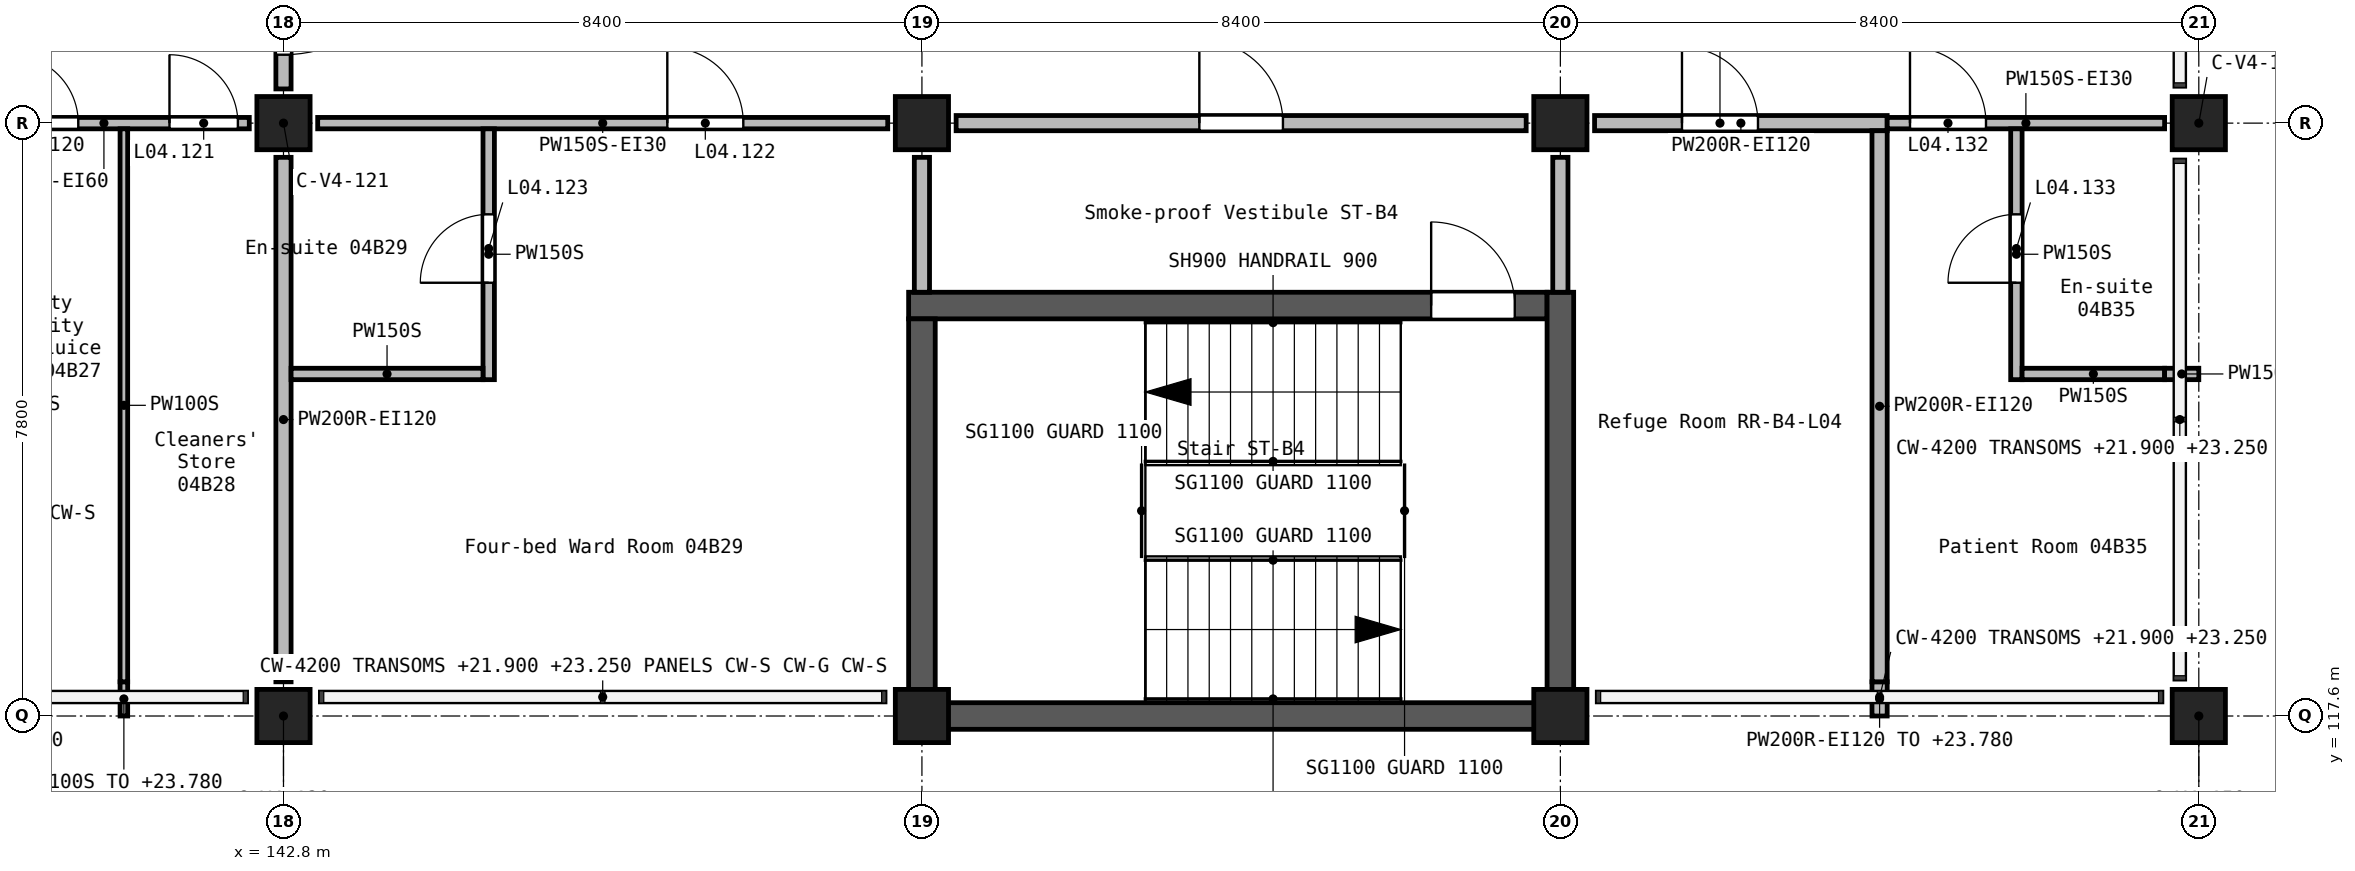
"""IFC4 building model, lengths in metres.
Left out: names, types, materials, properties, quantities, classifications, styles, units other than length and angle.
Written with IfcOpenShell. Run it as: python <this file> out.ifc"""

import sys

from ifc_helpers import new_model, si_unit, direction, frame, frame_2d, origin, origin_2d, place, context, subcontext, project, spatial, rectangle, extrude, element, fill, save


model = new_model("IFC4")
c1 = context("Model", 3, precision=1e-05, world=origin(), true_north=direction((0.0, 1.0)))
c2 = subcontext(c1, "Body", "Model", "MODEL_VIEW")
j1 = project(units=[si_unit("LENGTHUNIT", "METRE"), si_unit("PLANEANGLEUNIT", "RADIAN")], contexts=[c1])
p1 = place(None, origin())
s1 = spatial("IfcSite", under=j1, at=p1, CompositionType="ELEMENT")
p2 = place(p1, origin())
s2 = spatial("IfcBuilding", under=s1, at=p2, CompositionType="ELEMENT")
p3 = place(p2, frame((0.0, 0.0, 21.0)))
s3 = spatial("IfcBuildingStorey", under=s2, at=p3, CompositionType="ELEMENT", Elevation=21.0)
for number, where, z_axis, x_axis in (
    (1, (142.8, 117.6, 0.0), (0.0, 0.0, 1.0), (1.0, 0.0, 0.0)),
    (2, (142.8, 125.4, 0.0), (0.0, 0.0, 1.0), (1.0, 0.0, 0.0)),
    (3, (151.2, 117.6, 0.0), (0.0, 0.0, 1.0), (1.0, 0.0, 0.0)),
    (4, (151.2, 125.4, 0.0), (0.0, 0.0, 1.0), (1.0, 0.0, 0.0)),
    (5, (159.6, 117.6, 0.0), (0.0, 0.0, 1.0), (1.0, 0.0, 0.0)),
    (6, (159.6, 125.4, 0.0), (0.0, 0.0, 1.0), (1.0, 0.0, 0.0)),
    (7, (168.0, 117.6, 0.0), (0.0, 0.0, 1.0), (1.0, 0.0, 0.0)),
    (8, (168.0, 125.4, 0.0), (0.0, 0.0, 1.0), (1.0, 0.0, 0.0)),
):
    element("IfcColumn", number, at=place(p3, frame(where, z_axis=z_axis, x_axis=x_axis)), inside=s3, PredefinedType="COLUMN", context=c2, shape_type="SweptSolid", body=[
        extrude(rectangle(XDim=0.7, YDim=0.7, at=origin_2d()), origin(), (0.0, 0.0, 1.0), 3.9),
    ])
p4 = place(p3, frame((151.025, 123.0, 0.0), z_axis=(0.0, 0.0, 1.0), x_axis=(1.0, 0.0, 0.0)))
e9 = element("IfcWall", 9, at=p4, inside=s3, PredefinedType="SHEAR", context=c2, shape_type="SweptSolid", body=[
    extrude(rectangle(XDim=8.4, YDim=0.35, at=frame_2d((4.2, 0.0))), origin(), (0.0, 0.0, 1.0), 3.9),
])
p5 = place(p4, frame((6.875, 0.0, 0.0)))
e10 = element("IfcOpeningElement", 10, at=p5, cuts=e9, PredefinedType="OPENING", context=c2, shape_type="SweptSolid", body=[
    extrude(rectangle(XDim=1.1, YDim=2.1, at=frame_2d((0.55, 1.05))), frame((0.0, 0.185, 0.0), z_axis=(0.0, -1.0, 0.0), x_axis=(1.0, 0.0, 0.0)), (0.0, 0.0, 1.0), 0.37),
])
p6 = place(p3, frame((151.2, 117.425, 0.0), z_axis=(0.0, 0.0, 1.0), x_axis=(0.0, 1.0, 0.0)))
e11 = element("IfcWall", 11, at=p6, inside=s3, PredefinedType="SHEAR", context=c2, shape_type="SweptSolid", body=[
    extrude(rectangle(XDim=5.4, YDim=0.35, at=frame_2d((2.7, 0.0))), origin(), (0.0, 0.0, 1.0), 3.9),
])
p7 = place(p3, frame((151.375, 117.6, 0.0), z_axis=(0.0, 0.0, 1.0), x_axis=(1.0, 0.0, 0.0)))
e12 = element("IfcWall", 12, at=p7, inside=s3, PredefinedType="SHEAR", context=c2, shape_type="SweptSolid", body=[
    extrude(rectangle(XDim=8.05, YDim=0.35, at=frame_2d((4.025, 0.0))), origin(), (0.0, 0.0, 1.0), 3.9),
])
p8 = place(p3, frame((159.6, 117.425, 0.0), z_axis=(0.0, 0.0, 1.0), x_axis=(0.0, 1.0, 0.0)))
e13 = element("IfcWall", 13, at=p8, inside=s3, PredefinedType="SHEAR", context=c2, shape_type="SweptSolid", body=[
    extrude(rectangle(XDim=5.75, YDim=0.35, at=frame_2d((2.875, 0.0))), origin(), (0.0, 0.0, 1.0), 3.9),
])
p9 = place(p3, frame((142.8, 128.55, 0.0), z_axis=(0.0, 0.0, 1.0), x_axis=(0.0, -1.0, 0.0)))
e14 = element("IfcWall", 14, at=p9, inside=s3, PredefinedType="SOLIDWALL", context=c2, shape_type="SweptSolid", body=[
    extrude(rectangle(XDim=2.7, YDim=0.2, at=frame_2d((1.35, 0.0))), origin(), (0.0, 0.0, 1.0), 3.6),
])
p10 = place(p9, frame((0.45, 0.0, 0.0)))
e15 = element("IfcOpeningElement", 15, at=p10, cuts=e14, PredefinedType="OPENING", context=c2, shape_type="SweptSolid", body=[
    extrude(rectangle(XDim=1.8, YDim=2.1, at=frame_2d((0.9, 1.05))), frame((0.0, 0.11, 0.0), z_axis=(0.0, -1.0, 0.0), x_axis=(1.0, 0.0, 0.0)), (0.0, 0.0, 1.0), 0.22),
])
p11 = place(p3, frame((142.8, 124.95, 0.0), z_axis=(0.0, 0.0, 1.0), x_axis=(0.0, -1.0, 0.0)))
e16 = element("IfcWall", 16, at=p11, inside=s3, PredefinedType="SOLIDWALL", context=c2, shape_type="SweptSolid", body=[
    extrude(rectangle(XDim=6.9, YDim=0.2, at=frame_2d((3.45, 0.0))), origin(), (0.0, 0.0, 1.0), 3.6),
])
p12 = place(p3, frame((151.65, 125.4, 0.0), z_axis=(0.0, 0.0, 1.0), x_axis=(1.0, 0.0, 0.0)))
e17 = element("IfcWall", 17, at=p12, inside=s3, PredefinedType="SOLIDWALL", context=c2, shape_type="SweptSolid", body=[
    extrude(rectangle(XDim=7.5, YDim=0.2, at=frame_2d((3.75, 0.0))), origin(), (0.0, 0.0, 1.0), 3.6),
])
p13 = place(p12, frame((3.2, 0.0, 0.0)))
e18 = element("IfcOpeningElement", 18, at=p13, cuts=e17, PredefinedType="OPENING", context=c2, shape_type="SweptSolid", body=[
    extrude(rectangle(XDim=1.1, YDim=2.1, at=frame_2d((0.55, 1.05))), frame((0.0, 0.11, 0.0), z_axis=(0.0, -1.0, 0.0), x_axis=(1.0, 0.0, 0.0)), (0.0, 0.0, 1.0), 0.22),
])
p14 = place(p3, frame((160.05, 125.4, 0.0), z_axis=(0.0, 0.0, 1.0), x_axis=(1.0, 0.0, 0.0)))
e19 = element("IfcWall", 19, at=p14, inside=s3, PredefinedType="SOLIDWALL", context=c2, shape_type="SweptSolid", body=[
    extrude(rectangle(XDim=3.85, YDim=0.2, at=frame_2d((1.925, 0.0))), origin(), (0.0, 0.0, 1.0), 3.6),
])
p15 = place(p14, frame((1.15, 0.0, 0.0)))
e20 = element("IfcOpeningElement", 20, at=p15, cuts=e19, PredefinedType="OPENING", context=c2, shape_type="SweptSolid", body=[
    extrude(rectangle(XDim=1.0, YDim=2.1, at=frame_2d((0.5, 1.05))), frame((0.0, 0.11, 0.0), z_axis=(0.0, -1.0, 0.0), x_axis=(1.0, 0.0, 0.0)), (0.0, 0.0, 1.0), 0.22),
])
p16 = place(p3, frame((159.6, 123.175, 0.0), z_axis=(0.0, 0.0, 1.0), x_axis=(0.0, 1.0, 0.0)))
e21 = element("IfcWall", 21, at=p16, inside=s3, PredefinedType="SOLIDWALL", context=c2, shape_type="SweptSolid", body=[
    extrude(rectangle(XDim=1.775, YDim=0.2, at=frame_2d((0.887, 0.0))), origin(), (0.0, 0.0, 1.0), 3.6),
])
p17 = place(p3, frame((163.8, 117.6, 0.0), z_axis=(0.0, 0.0, 1.0), x_axis=(0.0, 1.0, 0.0)))
e22 = element("IfcWall", 22, at=p17, inside=s3, PredefinedType="SOLIDWALL", context=c2, shape_type="SweptSolid", body=[
    extrude(rectangle(XDim=0.45, YDim=0.2, at=frame_2d((0.225, 0.0))), origin(), (0.0, 0.0, 1.0), 2.78),
])
p18 = place(p3, frame((163.8, 118.05, 0.0), z_axis=(0.0, 0.0, 1.0), x_axis=(0.0, 1.0, 0.0)))
e23 = element("IfcWall", 23, at=p18, inside=s3, PredefinedType="SOLIDWALL", context=c2, shape_type="SweptSolid", body=[
    extrude(rectangle(XDim=7.25, YDim=0.2, at=frame_2d((3.625, 0.0))), origin(), (0.0, 0.0, 1.0), 3.6),
])
p19 = place(p3, frame((151.2, 123.175, 0.0), z_axis=(0.0, 0.0, 1.0), x_axis=(0.0, 1.0, 0.0)))
e24 = element("IfcWall", 24, at=p19, inside=s3, PredefinedType="SOLIDWALL", context=c2, shape_type="SweptSolid", body=[
    extrude(rectangle(XDim=1.775, YDim=0.2, at=frame_2d((0.887, 0.0))), origin(), (0.0, 0.0, 1.0), 3.6),
])
p20 = place(p3, frame((143.25, 125.4, 0.0), z_axis=(0.0, 0.0, 1.0), x_axis=(1.0, 0.0, 0.0)))
e25 = element("IfcWall", 25, at=p20, inside=s3, PredefinedType="PARTITIONING", context=c2, shape_type="SweptSolid", body=[
    extrude(rectangle(XDim=7.5, YDim=0.15, at=frame_2d((3.75, 0.0))), origin(), (0.0, 0.0, 1.0), 3.6),
])
p21 = place(p20, frame((4.6, 0.0, 0.0)))
e26 = element("IfcOpeningElement", 26, at=p21, cuts=e25, PredefinedType="OPENING", context=c2, shape_type="SweptSolid", body=[
    extrude(rectangle(XDim=1.0, YDim=2.1, at=frame_2d((0.5, 1.05))), frame((0.0, 0.085, 0.0), z_axis=(0.0, -1.0, 0.0), x_axis=(1.0, 0.0, 0.0)), (0.0, 0.0, 1.0), 0.17),
])
p22 = place(p3, frame((138.525, 125.4, 0.0), z_axis=(0.0, 0.0, 1.0), x_axis=(1.0, 0.0, 0.0)))
e27 = element("IfcWall", 27, at=p22, inside=s3, PredefinedType="PARTITIONING", context=c2, shape_type="SweptSolid", body=[
    extrude(rectangle(XDim=3.825, YDim=0.15, at=frame_2d((1.913, 0.0))), origin(), (0.0, 0.0, 1.0), 3.6),
])
p23 = place(p22, frame((0.675, 0.0, 0.0)))
e28 = element("IfcOpeningElement", 28, at=p23, cuts=e27, PredefinedType="OPENING", context=c2, shape_type="SweptSolid", body=[
    extrude(rectangle(XDim=0.9, YDim=2.1, at=frame_2d((0.45, 1.05))), frame((0.0, 0.085, 0.0), z_axis=(0.0, -1.0, 0.0), x_axis=(1.0, 0.0, 0.0)), (0.0, 0.0, 1.0), 0.17),
])
p24 = place(p22, frame((2.775, 0.0, 0.0)))
e29 = element("IfcOpeningElement", 29, at=p24, cuts=e27, PredefinedType="OPENING", context=c2, shape_type="SweptSolid", body=[
    extrude(rectangle(XDim=0.9, YDim=2.1, at=frame_2d((0.45, 1.05))), frame((0.0, 0.085, 0.0), z_axis=(0.0, -1.0, 0.0), x_axis=(1.0, 0.0, 0.0)), (0.0, 0.0, 1.0), 0.17),
])
p25 = place(p3, frame((163.9, 125.4, 0.0), z_axis=(0.0, 0.0, 1.0), x_axis=(1.0, 0.0, 0.0)))
e30 = element("IfcWall", 30, at=p25, inside=s3, PredefinedType="PARTITIONING", context=c2, shape_type="SweptSolid", body=[
    extrude(rectangle(XDim=3.65, YDim=0.15, at=frame_2d((1.825, 0.0))), origin(), (0.0, 0.0, 1.0), 3.6),
])
p26 = place(p25, frame((0.3, 0.0, 0.0)))
e31 = element("IfcOpeningElement", 31, at=p26, cuts=e30, PredefinedType="OPENING", context=c2, shape_type="SweptSolid", body=[
    extrude(rectangle(XDim=1.0, YDim=2.1, at=frame_2d((0.5, 1.05))), frame((0.0, 0.085, 0.0), z_axis=(0.0, -1.0, 0.0), x_axis=(1.0, 0.0, 0.0)), (0.0, 0.0, 1.0), 0.17),
])
p27 = place(p3, frame((145.5, 122.025, 0.0), z_axis=(0.0, 0.0, 1.0), x_axis=(0.0, 1.0, 0.0)))
e32 = element("IfcWall", 32, at=p27, inside=s3, PredefinedType="PARTITIONING", context=c2, shape_type="SweptSolid", body=[
    extrude(rectangle(XDim=3.3, YDim=0.15, at=frame_2d((1.65, 0.0))), origin(), (0.0, 0.0, 1.0), 3.6),
])
p28 = place(p27, frame((1.275, 0.0, 0.0)))
e33 = element("IfcOpeningElement", 33, at=p28, cuts=e32, PredefinedType="OPENING", context=c2, shape_type="SweptSolid", body=[
    extrude(rectangle(XDim=0.9, YDim=2.1, at=frame_2d((0.45, 1.05))), frame((0.0, 0.085, 0.0), z_axis=(0.0, -1.0, 0.0), x_axis=(1.0, 0.0, 0.0)), (0.0, 0.0, 1.0), 0.17),
])
p29 = place(p3, frame((165.6, 122.025, 0.0), z_axis=(0.0, 0.0, 1.0), x_axis=(0.0, 1.0, 0.0)))
e34 = element("IfcWall", 34, at=p29, inside=s3, PredefinedType="PARTITIONING", context=c2, shape_type="SweptSolid", body=[
    extrude(rectangle(XDim=3.3, YDim=0.15, at=frame_2d((1.65, 0.0))), origin(), (0.0, 0.0, 1.0), 3.6),
])
p30 = place(p29, frame((1.275, 0.0, 0.0)))
e35 = element("IfcOpeningElement", 35, at=p30, cuts=e34, PredefinedType="OPENING", context=c2, shape_type="SweptSolid", body=[
    extrude(rectangle(XDim=0.9, YDim=2.1, at=frame_2d((0.45, 1.05))), frame((0.0, 0.085, 0.0), z_axis=(0.0, -1.0, 0.0), x_axis=(1.0, 0.0, 0.0)), (0.0, 0.0, 1.0), 0.17),
])
p31 = place(p3, frame((142.9, 122.1, 0.0), z_axis=(0.0, 0.0, 1.0), x_axis=(1.0, 0.0, 0.0)))
e36 = element("IfcWall", 36, at=p31, inside=s3, PredefinedType="PARTITIONING", context=c2, shape_type="SweptSolid", body=[
    extrude(rectangle(XDim=2.525, YDim=0.15, at=frame_2d((1.263, 0.0))), origin(), (0.0, 0.0, 1.0), 3.6),
])
p32 = place(p3, frame((165.675, 122.1, 0.0), z_axis=(0.0, 0.0, 1.0), x_axis=(1.0, 0.0, 0.0)))
e37 = element("IfcWall", 37, at=p32, inside=s3, PredefinedType="PARTITIONING", context=c2, shape_type="SweptSolid", body=[
    extrude(rectangle(XDim=1.875, YDim=0.15, at=frame_2d((0.938, 0.0))), origin(), (0.0, 0.0, 1.0), 3.6),
])
p33 = place(p3, frame((167.55, 122.1, 0.0), z_axis=(0.0, 0.0, 1.0), x_axis=(1.0, 0.0, 0.0)))
e38 = element("IfcWall", 38, at=p33, inside=s3, PredefinedType="PARTITIONING", context=c2, shape_type="SweptSolid", body=[
    extrude(rectangle(XDim=0.45, YDim=0.15, at=frame_2d((0.225, 0.0))), origin(), (0.0, 0.0, 1.0), 2.78),
])
p34 = place(p3, frame((140.7, 117.6, 0.0), z_axis=(0.0, 0.0, 1.0), x_axis=(0.0, 1.0, 0.0)))
e39 = element("IfcWall", 39, at=p34, inside=s3, PredefinedType="PARTITIONING", context=c2, shape_type="SweptSolid", body=[
    extrude(rectangle(XDim=0.45, YDim=0.1, at=frame_2d((0.225, 0.0))), origin(), (0.0, 0.0, 1.0), 2.78),
])
p35 = place(p3, frame((140.7, 118.05, 0.0), z_axis=(0.0, 0.0, 1.0), x_axis=(0.0, 1.0, 0.0)))
e40 = element("IfcWall", 40, at=p35, inside=s3, PredefinedType="PARTITIONING", context=c2, shape_type="SweptSolid", body=[
    extrude(rectangle(XDim=7.275, YDim=0.1, at=frame_2d((3.637, 0.0))), origin(), (0.0, 0.0, 1.0), 3.6),
])
p36 = place(p10, origin())
e41 = element("IfcDoor", 41, at=p36, inside=s3, OperationType="DOUBLE_DOOR_SINGLE_SWING", PredefinedType="DOOR", context=c2, shape_type="SweptSolid", body=[
    extrude(rectangle(XDim=1.8, YDim=2.1, at=frame_2d((0.9, 1.05))), frame((0.0, 0.025, 0.0), z_axis=(0.0, -1.0, 0.0), x_axis=(1.0, 0.0, 0.0)), (0.0, 0.0, 1.0), 0.05),
])
fill(e15, e41)
p37 = place(p23, frame((0.9, 0.0, 0.0), z_axis=(0.0, 0.0, 1.0), x_axis=(-1.0, 0.0, 0.0)))
e42 = element("IfcDoor", 42, at=p37, inside=s3, OperationType="SINGLE_SWING_RIGHT", PredefinedType="DOOR", context=c2, shape_type="SweptSolid", body=[
    extrude(rectangle(XDim=0.9, YDim=2.1, at=frame_2d((0.45, 1.05))), frame((0.0, 0.025, 0.0), z_axis=(0.0, -1.0, 0.0), x_axis=(1.0, 0.0, 0.0)), (0.0, 0.0, 1.0), 0.05),
])
fill(e28, e42)
p38 = place(p24, frame((0.9, 0.0, 0.0), z_axis=(0.0, 0.0, 1.0), x_axis=(-1.0, 0.0, 0.0)))
e43 = element("IfcDoor", 43, at=p38, inside=s3, OperationType="SINGLE_SWING_LEFT", PredefinedType="DOOR", context=c2, shape_type="SweptSolid", body=[
    extrude(rectangle(XDim=0.9, YDim=2.1, at=frame_2d((0.45, 1.05))), frame((0.0, 0.025, 0.0), z_axis=(0.0, -1.0, 0.0), x_axis=(1.0, 0.0, 0.0)), (0.0, 0.0, 1.0), 0.05),
])
fill(e29, e43)
p39 = place(p21, frame((1.0, 0.0, 0.0), z_axis=(0.0, 0.0, 1.0), x_axis=(-1.0, 0.0, 0.0)))
e44 = element("IfcDoor", 44, at=p39, inside=s3, OperationType="SINGLE_SWING_LEFT", PredefinedType="DOOR", context=c2, shape_type="SweptSolid", body=[
    extrude(rectangle(XDim=1.0, YDim=2.1, at=frame_2d((0.5, 1.05))), frame((0.0, 0.025, 0.0), z_axis=(0.0, -1.0, 0.0), x_axis=(1.0, 0.0, 0.0)), (0.0, 0.0, 1.0), 0.05),
])
fill(e26, e44)
p40 = place(p28, origin())
e45 = element("IfcDoor", 45, at=p40, inside=s3, OperationType="SINGLE_SWING_RIGHT", PredefinedType="DOOR", context=c2, shape_type="SweptSolid", body=[
    extrude(rectangle(XDim=0.9, YDim=2.1, at=frame_2d((0.45, 1.05))), frame((0.0, 0.025, 0.0), z_axis=(0.0, -1.0, 0.0), x_axis=(1.0, 0.0, 0.0)), (0.0, 0.0, 1.0), 0.05),
])
fill(e33, e45)
p41 = place(p26, frame((1.0, 0.0, 0.0), z_axis=(0.0, 0.0, 1.0), x_axis=(-1.0, 0.0, 0.0)))
e46 = element("IfcDoor", 46, at=p41, inside=s3, OperationType="SINGLE_SWING_RIGHT", PredefinedType="DOOR", context=c2, shape_type="SweptSolid", body=[
    extrude(rectangle(XDim=1.0, YDim=2.1, at=frame_2d((0.5, 1.05))), frame((0.0, 0.025, 0.0), z_axis=(0.0, -1.0, 0.0), x_axis=(1.0, 0.0, 0.0)), (0.0, 0.0, 1.0), 0.05),
])
fill(e31, e46)
p42 = place(p30, frame((0.9, 0.0, 0.0), z_axis=(0.0, 0.0, 1.0), x_axis=(-1.0, 0.0, 0.0)))
e47 = element("IfcDoor", 47, at=p42, inside=s3, OperationType="SINGLE_SWING_LEFT", PredefinedType="DOOR", context=c2, shape_type="SweptSolid", body=[
    extrude(rectangle(XDim=0.9, YDim=2.1, at=frame_2d((0.45, 1.05))), frame((0.0, 0.025, 0.0), z_axis=(0.0, -1.0, 0.0), x_axis=(1.0, 0.0, 0.0)), (0.0, 0.0, 1.0), 0.05),
])
fill(e35, e47)
p43 = place(p15, frame((1.0, 0.0, 0.0), z_axis=(0.0, 0.0, 1.0), x_axis=(-1.0, 0.0, 0.0)))
e48 = element("IfcDoor", 48, at=p43, inside=s3, OperationType="SINGLE_SWING_RIGHT", PredefinedType="DOOR", context=c2, shape_type="SweptSolid", body=[
    extrude(rectangle(XDim=1.0, YDim=2.1, at=frame_2d((0.5, 1.05))), frame((0.0, 0.025, 0.0), z_axis=(0.0, -1.0, 0.0), x_axis=(1.0, 0.0, 0.0)), (0.0, 0.0, 1.0), 0.05),
])
fill(e20, e48)
p44 = place(p5, frame((1.1, 0.0, 0.0), z_axis=(0.0, 0.0, 1.0), x_axis=(-1.0, 0.0, 0.0)))
e49 = element("IfcDoor", 49, at=p44, inside=s3, OperationType="SINGLE_SWING_LEFT", PredefinedType="DOOR", context=c2, shape_type="SweptSolid", body=[
    extrude(rectangle(XDim=1.1, YDim=2.1, at=frame_2d((0.55, 1.05))), frame((0.0, 0.025, 0.0), z_axis=(0.0, -1.0, 0.0), x_axis=(1.0, 0.0, 0.0)), (0.0, 0.0, 1.0), 0.05),
])
fill(e10, e49)
p45 = place(p13, frame((1.1, 0.0, 0.0), z_axis=(0.0, 0.0, 1.0), x_axis=(-1.0, 0.0, 0.0)))
e50 = element("IfcDoor", 50, at=p45, inside=s3, OperationType="SINGLE_SWING_LEFT", PredefinedType="DOOR", context=c2, shape_type="SweptSolid", body=[
    extrude(rectangle(XDim=1.1, YDim=2.1, at=frame_2d((0.55, 1.05))), frame((0.0, 0.025, 0.0), z_axis=(0.0, -1.0, 0.0), x_axis=(1.0, 0.0, 0.0)), (0.0, 0.0, 1.0), 0.05),
])
fill(e18, e50)
save(model, sys.argv[1])
